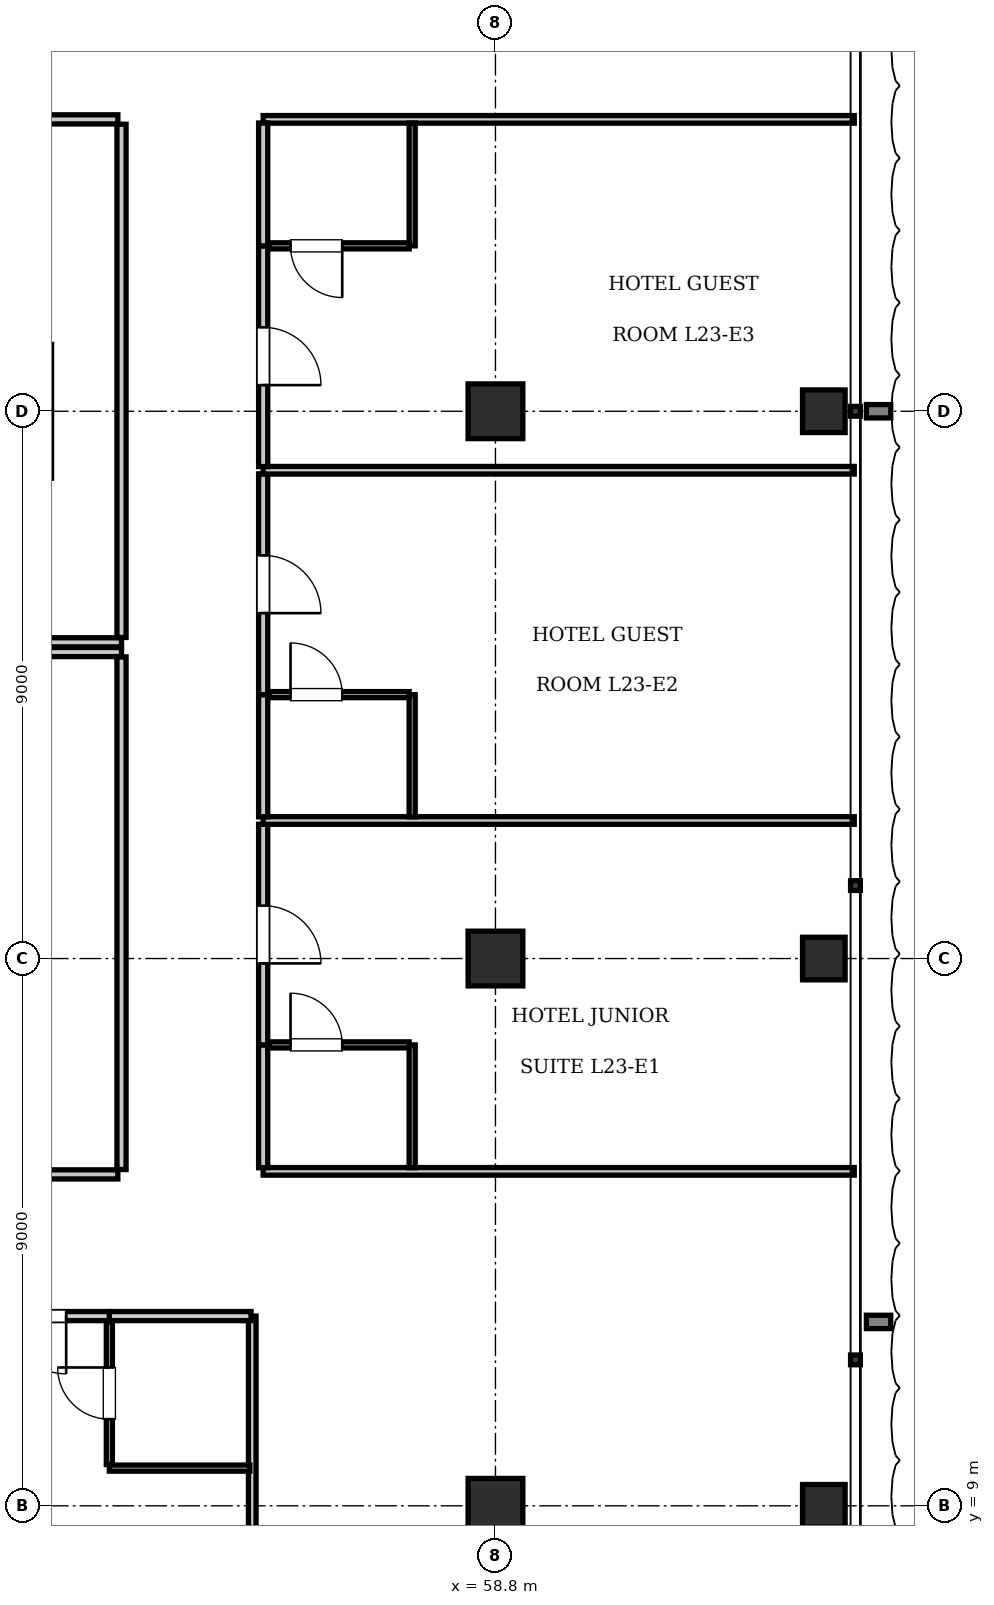
"""IFC4 building model, lengths in metres.
Left out: names, types, materials, properties, quantities, classifications, styles, units other than length and angle.
Written with IfcOpenShell. Run it as: python <this file> out.ifc"""

import sys

from ifc_helpers import new_model, si_unit, direction, frame, frame_2d, origin, origin_2d, place, context, subcontext, project, spatial, rectangle, i_section, extrude, element, fill, save


model = new_model("IFC4")
c1 = context("Model", 3, precision=1e-05, world=origin(), true_north=direction((0.0, 1.0)))
c2 = subcontext(c1, "Body", "Model", "MODEL_VIEW")
j1 = project(units=[si_unit("LENGTHUNIT", "METRE"), si_unit("PLANEANGLEUNIT", "RADIAN")], contexts=[c1])
p1 = place(None, origin())
s1 = spatial("IfcSite", under=j1, at=p1, CompositionType="ELEMENT")
p2 = place(p1, origin())
s2 = spatial("IfcBuilding", under=s1, at=p2, CompositionType="ELEMENT")
p3 = place(p2, frame((0.0, 0.0, 96.25)))
s3 = spatial("IfcBuildingStorey", under=s2, at=p3, CompositionType="ELEMENT", Elevation=96.25)
for number, where, z_axis, x_axis in (
    (1, (58.8, 9.0, 0.0), (0.0, 0.0, 1.0), (1.0, 0.0, 0.0)),
    (2, (58.8, 18.0, 0.0), (0.0, 0.0, 1.0), (1.0, 0.0, 0.0)),
    (3, (58.8, 27.0, 0.0), (0.0, 0.0, 1.0), (1.0, 0.0, 0.0)),
):
    element("IfcColumn", number, at=place(p3, frame(where, z_axis=z_axis, x_axis=x_axis)), inside=s3, PredefinedType="COLUMN", context=c2, shape_type="SweptSolid", body=[
        extrude(rectangle(XDim=0.9, YDim=0.9, at=origin_2d()), origin(), (0.0, 0.0, 1.0), 3.85),
    ])
for number, where, z_axis, x_axis in (
    (4, (64.2, 9.0, 0.0), (0.0, 0.0, 1.0), (1.0, 0.0, 0.0)),
    (5, (64.2, 18.0, 0.0), (0.0, 0.0, 1.0), (1.0, 0.0, 0.0)),
    (6, (64.2, 27.0, 0.0), (0.0, 0.0, 1.0), (1.0, 0.0, 0.0)),
):
    element("IfcColumn", number, at=place(p3, frame(where, z_axis=z_axis, x_axis=x_axis)), inside=s3, PredefinedType="COLUMN", context=c2, shape_type="SweptSolid", body=[
        extrude(i_section(OverallWidth=0.7, OverallDepth=0.7, WebThickness=0.028, FlangeThickness=0.044, at=origin_2d()), origin(), (0.0, 0.0, 1.0), 3.85),
    ])
p4 = place(p3, frame((22.95, 23.2, 0.0), z_axis=(0.0, 0.0, 1.0), x_axis=(1.0, 0.0, 0.0)))
e7 = element("IfcWall", 7, at=p4, inside=s3, PredefinedType="PARTITIONING", context=c2, shape_type="SweptSolid", body=[
    extrude(rectangle(XDim=29.7, YDim=0.15, at=frame_2d((14.85, 0.0))), origin(), (0.0, 0.0, 1.0), 3.61),
])
p5 = place(p3, frame((52.65, 23.28, 0.0), z_axis=(0.0, 0.0, 1.0), x_axis=(0.0, 1.0, 0.0)))
e8 = element("IfcWall", 8, at=p5, inside=s3, PredefinedType="PARTITIONING", context=c2, shape_type="SweptSolid", body=[
    extrude(rectangle(XDim=8.44, YDim=0.15, at=frame_2d((4.22, 0.0))), origin(), (0.0, 0.0, 1.0), 3.61),
])
p6 = place(p3, frame((42.582, 31.8, 0.0), z_axis=(0.0, 0.0, 1.0), x_axis=(1.0, 0.0, 0.0)))
e9 = element("IfcWall", 9, at=p6, inside=s3, PredefinedType="PARTITIONING", context=c2, shape_type="SweptSolid", body=[
    extrude(rectangle(XDim=10.008, YDim=0.15, at=frame_2d((5.004, 0.0))), origin(), (0.0, 0.0, 1.0), 3.61),
])
p7 = place(p6, frame((4.554, 0.0, 0.0)))
e10 = element("IfcOpeningElement", 10, at=p7, cuts=e9, PredefinedType="OPENING", context=c2, shape_type="SweptSolid", body=[
    extrude(rectangle(XDim=0.9, YDim=2.1, at=frame_2d((0.45, 1.05))), frame((0.0, 0.085, 0.0), z_axis=(0.0, -1.0, 0.0), x_axis=(1.0, 0.0, 0.0)), (0.0, 0.0, 1.0), 0.17),
])
p8 = place(p3, frame((22.95, 23.04, 0.0), z_axis=(0.0, 0.0, 1.0), x_axis=(1.0, 0.0, 0.0)))
e11 = element("IfcWall", 11, at=p8, inside=s3, PredefinedType="PARTITIONING", context=c2, shape_type="SweptSolid", body=[
    extrude(rectangle(XDim=29.7, YDim=0.15, at=frame_2d((14.85, 0.0))), origin(), (0.0, 0.0, 1.0), 3.61),
])
p9 = place(p3, frame((52.65, 14.53, 0.0), z_axis=(0.0, 0.0, 1.0), x_axis=(0.0, 1.0, 0.0)))
e12 = element("IfcWall", 12, at=p9, inside=s3, PredefinedType="PARTITIONING", context=c2, shape_type="SweptSolid", body=[
    extrude(rectangle(XDim=8.43, YDim=0.15, at=frame_2d((4.215, 0.0))), origin(), (0.0, 0.0, 1.0), 3.61),
])
p10 = place(p3, frame((33.969, 14.45, 0.0), z_axis=(0.0, 0.0, 1.0), x_axis=(1.0, 0.0, 0.0)))
e13 = element("IfcWall", 13, at=p10, inside=s3, PredefinedType="PARTITIONING", context=c2, shape_type="SweptSolid", body=[
    extrude(rectangle(XDim=18.621, YDim=0.15, at=frame_2d((9.311, 0.0))), origin(), (0.0, 0.0, 1.0), 3.61),
])
p11 = place(p10, frame((8.861, 0.0, 0.0)))
e14 = element("IfcOpeningElement", 14, at=p11, cuts=e13, PredefinedType="OPENING", context=c2, shape_type="SweptSolid", body=[
    extrude(rectangle(XDim=0.9, YDim=2.1, at=frame_2d((0.45, 1.05))), frame((0.0, 0.085, 0.0), z_axis=(0.0, -1.0, 0.0), x_axis=(1.0, 0.0, 0.0)), (0.0, 0.0, 1.0), 0.17),
])
p12 = place(p3, frame((54.8, 0.1, 0.0), z_axis=(0.0, 0.0, 1.0), x_axis=(0.0, 1.0, 0.0)))
e15 = element("IfcWall", 15, at=p12, inside=s3, PredefinedType="PARTITIONING", context=c2, shape_type="SweptSolid", body=[
    extrude(rectangle(XDim=12.02, YDim=0.125, at=frame_2d((6.01, 0.0))), origin(), (0.0, 0.0, 1.0), 3.61),
])
p13 = place(p3, frame((52.45, 12.12, 0.0), z_axis=(0.0, 0.0, 1.0), x_axis=(1.0, 0.0, 0.0)))
e16 = element("IfcWall", 16, at=p13, inside=s3, PredefinedType="PARTITIONING", context=c2, shape_type="SweptSolid", body=[
    extrude(rectangle(XDim=2.33, YDim=0.15, at=frame_2d((1.165, 0.0))), origin(), (0.0, 0.0, 1.0), 3.61),
])
p14 = place(p3, frame((52.45, 9.62, 0.0), z_axis=(0.0, 0.0, 1.0), x_axis=(1.0, 0.0, 0.0)))
e17 = element("IfcWall", 17, at=p14, inside=s3, PredefinedType="PARTITIONING", context=c2, shape_type="SweptSolid", body=[
    extrude(rectangle(XDim=2.31, YDim=0.1, at=frame_2d((1.155, 0.0))), origin(), (0.0, 0.0, 1.0), 3.61),
])
p15 = place(p3, frame((52.45, 9.68, 0.0), z_axis=(0.0, 0.0, 1.0), x_axis=(0.0, 1.0, 0.0)))
e18 = element("IfcWall", 18, at=p15, inside=s3, PredefinedType="PARTITIONING", context=c2, shape_type="SweptSolid", body=[
    extrude(rectangle(XDim=2.34, YDim=0.1, at=frame_2d((1.17, 0.0))), origin(), (0.0, 0.0, 1.0), 3.61),
])
p16 = place(p15, frame((0.745, 0.0, 0.0)))
e19 = element("IfcOpeningElement", 19, at=p16, cuts=e18, PredefinedType="OPENING", context=c2, shape_type="SweptSolid", body=[
    extrude(rectangle(XDim=0.85, YDim=2.1, at=frame_2d((0.425, 1.05))), frame((0.0, 0.06, 0.0), z_axis=(0.0, -1.0, 0.0), x_axis=(1.0, 0.0, 0.0)), (0.0, 0.0, 1.0), 0.12),
])
p17 = place(p3, frame((50.08, 12.12, 0.0), z_axis=(0.0, 0.0, 1.0), x_axis=(1.0, 0.0, 0.0)))
e20 = element("IfcWall", 20, at=p17, inside=s3, PredefinedType="PARTITIONING", context=c2, shape_type="SweptSolid", body=[
    extrude(rectangle(XDim=2.37, YDim=0.15, at=frame_2d((1.185, 0.0))), origin(), (0.0, 0.0, 1.0), 3.61),
])
p18 = place(p17, frame((0.71, 0.0, 0.0)))
e21 = element("IfcOpeningElement", 21, at=p18, cuts=e20, PredefinedType="OPENING", context=c2, shape_type="SweptSolid", body=[
    extrude(rectangle(XDim=0.95, YDim=2.15, at=frame_2d((0.475, 1.075))), frame((0.0, 0.085, 0.0), z_axis=(0.0, -1.0, 0.0), x_axis=(1.0, 0.0, 0.0)), (0.0, 0.0, 1.0), 0.17),
])
for number, where, z_axis, x_axis in (
    (22, (54.98, 14.5, 0.0), (0.0, 0.0, 1.0), (1.0, 0.0, 0.0)),
    (23, (54.98, 31.8, 0.0), (0.0, 0.0, 1.0), (1.0, 0.0, 0.0)),
):
    element("IfcWall", number, at=place(p3, frame(where, z_axis=z_axis, x_axis=x_axis)), inside=s3, PredefinedType="PARTITIONING", context=c2, shape_type="SweptSolid", body=[
        extrude(rectangle(XDim=9.72, YDim=0.125, at=frame_2d((4.86, 0.0))), origin(), (0.0, 0.0, 1.0), 3.61),
    ])
p19 = place(p3, frame((54.98, 14.56, 0.0), z_axis=(0.0, 0.0, 1.0), x_axis=(0.0, 1.0, 0.0)))
e24 = element("IfcWall", 24, at=p19, inside=s3, PredefinedType="PARTITIONING", context=c2, shape_type="SweptSolid", body=[
    extrude(rectangle(XDim=2.02, YDim=0.15, at=frame_2d((1.01, 0.0))), origin(), (0.0, 0.0, 1.0), 3.61),
])
p20 = place(p3, frame((54.98, 16.58, 0.0), z_axis=(0.0, 0.0, 1.0), x_axis=(0.0, 1.0, 0.0)))
e25 = element("IfcWall", 25, at=p20, inside=s3, PredefinedType="PARTITIONING", context=c2, shape_type="SweptSolid", body=[
    extrude(rectangle(XDim=3.63, YDim=0.15, at=frame_2d((1.815, 0.0))), origin(), (0.0, 0.0, 1.0), 3.61),
])
p21 = place(p20, frame((1.34, 0.0, 0.0)))
e26 = element("IfcOpeningElement", 26, at=p21, cuts=e25, PredefinedType="OPENING", context=c2, shape_type="SweptSolid", body=[
    extrude(rectangle(XDim=0.95, YDim=2.15, at=frame_2d((0.475, 1.075))), frame((0.0, 0.085, 0.0), z_axis=(0.0, -1.0, 0.0), x_axis=(1.0, 0.0, 0.0)), (0.0, 0.0, 1.0), 0.17),
])
p22 = place(p3, frame((57.43, 14.56, 0.0), z_axis=(0.0, 0.0, 1.0), x_axis=(0.0, 1.0, 0.0)))
e27 = element("IfcWall", 27, at=p22, inside=s3, PredefinedType="PARTITIONING", context=c2, shape_type="SweptSolid", body=[
    extrude(rectangle(XDim=2.02, YDim=0.1, at=frame_2d((1.01, 0.0))), origin(), (0.0, 0.0, 1.0), 3.61),
])
p23 = place(p3, frame((55.08, 16.58, 0.0), z_axis=(0.0, 0.0, 1.0), x_axis=(1.0, 0.0, 0.0)))
e28 = element("IfcWall", 28, at=p23, inside=s3, PredefinedType="PARTITIONING", context=c2, shape_type="SweptSolid", body=[
    extrude(rectangle(XDim=2.3, YDim=0.1, at=frame_2d((1.15, 0.0))), origin(), (0.0, 0.0, 1.0), 3.61),
])
p24 = place(p23, frame((0.35, 0.0, 0.0)))
e29 = element("IfcOpeningElement", 29, at=p24, cuts=e28, PredefinedType="OPENING", context=c2, shape_type="SweptSolid", body=[
    extrude(rectangle(XDim=0.85, YDim=2.1, at=frame_2d((0.425, 1.05))), frame((0.0, 0.06, 0.0), z_axis=(0.0, -1.0, 0.0), x_axis=(1.0, 0.0, 0.0)), (0.0, 0.0, 1.0), 0.12),
])
p25 = place(p3, frame((54.98, 20.27, 0.0), z_axis=(0.0, 0.0, 1.0), x_axis=(1.0, 0.0, 0.0)))
e30 = element("IfcWall", 30, at=p25, inside=s3, PredefinedType="PARTITIONING", context=c2, shape_type="SweptSolid", body=[
    extrude(rectangle(XDim=9.72, YDim=0.125, at=frame_2d((4.86, 0.0))), origin(), (0.0, 0.0, 1.0), 3.61),
])
p26 = place(p3, frame((54.98, 20.33, 0.0), z_axis=(0.0, 0.0, 1.0), x_axis=(0.0, 1.0, 0.0)))
e31 = element("IfcWall", 31, at=p26, inside=s3, PredefinedType="PARTITIONING", context=c2, shape_type="SweptSolid", body=[
    extrude(rectangle(XDim=2.01, YDim=0.15, at=frame_2d((1.005, 0.0))), origin(), (0.0, 0.0, 1.0), 3.61),
])
p27 = place(p3, frame((54.98, 22.34, 0.0), z_axis=(0.0, 0.0, 1.0), x_axis=(0.0, 1.0, 0.0)))
e32 = element("IfcWall", 32, at=p27, inside=s3, PredefinedType="PARTITIONING", context=c2, shape_type="SweptSolid", body=[
    extrude(rectangle(XDim=3.63, YDim=0.15, at=frame_2d((1.815, 0.0))), origin(), (0.0, 0.0, 1.0), 3.61),
])
p28 = place(p27, frame((1.34, 0.0, 0.0)))
e33 = element("IfcOpeningElement", 33, at=p28, cuts=e32, PredefinedType="OPENING", context=c2, shape_type="SweptSolid", body=[
    extrude(rectangle(XDim=0.95, YDim=2.15, at=frame_2d((0.475, 1.075))), frame((0.0, 0.085, 0.0), z_axis=(0.0, -1.0, 0.0), x_axis=(1.0, 0.0, 0.0)), (0.0, 0.0, 1.0), 0.17),
])
p29 = place(p3, frame((57.43, 20.33, 0.0), z_axis=(0.0, 0.0, 1.0), x_axis=(0.0, 1.0, 0.0)))
e34 = element("IfcWall", 34, at=p29, inside=s3, PredefinedType="PARTITIONING", context=c2, shape_type="SweptSolid", body=[
    extrude(rectangle(XDim=2.01, YDim=0.1, at=frame_2d((1.005, 0.0))), origin(), (0.0, 0.0, 1.0), 3.61),
])
p30 = place(p3, frame((55.08, 22.34, 0.0), z_axis=(0.0, 0.0, 1.0), x_axis=(1.0, 0.0, 0.0)))
e35 = element("IfcWall", 35, at=p30, inside=s3, PredefinedType="PARTITIONING", context=c2, shape_type="SweptSolid", body=[
    extrude(rectangle(XDim=2.3, YDim=0.1, at=frame_2d((1.15, 0.0))), origin(), (0.0, 0.0, 1.0), 3.61),
])
p31 = place(p30, frame((0.35, 0.0, 0.0)))
e36 = element("IfcOpeningElement", 36, at=p31, cuts=e35, PredefinedType="OPENING", context=c2, shape_type="SweptSolid", body=[
    extrude(rectangle(XDim=0.85, YDim=2.1, at=frame_2d((0.425, 1.05))), frame((0.0, 0.06, 0.0), z_axis=(0.0, -1.0, 0.0), x_axis=(1.0, 0.0, 0.0)), (0.0, 0.0, 1.0), 0.12),
])
p32 = place(p3, frame((54.98, 26.03, 0.0), z_axis=(0.0, 0.0, 1.0), x_axis=(1.0, 0.0, 0.0)))
e37 = element("IfcWall", 37, at=p32, inside=s3, PredefinedType="PARTITIONING", context=c2, shape_type="SweptSolid", body=[
    extrude(rectangle(XDim=9.72, YDim=0.125, at=frame_2d((4.86, 0.0))), origin(), (0.0, 0.0, 1.0), 3.61),
])
p33 = place(p3, frame((54.98, 26.09, 0.0), z_axis=(0.0, 0.0, 1.0), x_axis=(0.0, 1.0, 0.0)))
e38 = element("IfcWall", 38, at=p33, inside=s3, PredefinedType="PARTITIONING", context=c2, shape_type="SweptSolid", body=[
    extrude(rectangle(XDim=3.63, YDim=0.15, at=frame_2d((1.815, 0.0))), origin(), (0.0, 0.0, 1.0), 3.61),
])
p34 = place(p33, frame((1.34, 0.0, 0.0)))
e39 = element("IfcOpeningElement", 39, at=p34, cuts=e38, PredefinedType="OPENING", context=c2, shape_type="SweptSolid", body=[
    extrude(rectangle(XDim=0.95, YDim=2.15, at=frame_2d((0.475, 1.075))), frame((0.0, 0.085, 0.0), z_axis=(0.0, -1.0, 0.0), x_axis=(1.0, 0.0, 0.0)), (0.0, 0.0, 1.0), 0.17),
])
p35 = place(p3, frame((54.98, 29.72, 0.0), z_axis=(0.0, 0.0, 1.0), x_axis=(0.0, 1.0, 0.0)))
e40 = element("IfcWall", 40, at=p35, inside=s3, PredefinedType="PARTITIONING", context=c2, shape_type="SweptSolid", body=[
    extrude(rectangle(XDim=2.02, YDim=0.15, at=frame_2d((1.01, 0.0))), origin(), (0.0, 0.0, 1.0), 3.61),
])
p36 = place(p3, frame((57.43, 29.72, 0.0), z_axis=(0.0, 0.0, 1.0), x_axis=(0.0, 1.0, 0.0)))
e41 = element("IfcWall", 41, at=p36, inside=s3, PredefinedType="PARTITIONING", context=c2, shape_type="SweptSolid", body=[
    extrude(rectangle(XDim=2.02, YDim=0.1, at=frame_2d((1.01, 0.0))), origin(), (0.0, 0.0, 1.0), 3.61),
])
p37 = place(p3, frame((55.08, 29.72, 0.0), z_axis=(0.0, 0.0, 1.0), x_axis=(1.0, 0.0, 0.0)))
e42 = element("IfcWall", 42, at=p37, inside=s3, PredefinedType="PARTITIONING", context=c2, shape_type="SweptSolid", body=[
    extrude(rectangle(XDim=2.3, YDim=0.1, at=frame_2d((1.15, 0.0))), origin(), (0.0, 0.0, 1.0), 3.61),
])
p38 = place(p37, frame((0.35, 0.0, 0.0)))
e43 = element("IfcOpeningElement", 43, at=p38, cuts=e42, PredefinedType="OPENING", context=c2, shape_type="SweptSolid", body=[
    extrude(rectangle(XDim=0.85, YDim=2.1, at=frame_2d((0.425, 1.05))), frame((0.0, 0.06, 0.0), z_axis=(0.0, -1.0, 0.0), x_axis=(1.0, 0.0, 0.0)), (0.0, 0.0, 1.0), 0.12),
])
p39 = place(p16, origin())
e44 = element("IfcDoor", 44, at=p39, inside=s3, OperationType="SINGLE_SWING_RIGHT", PredefinedType="DOOR", context=c2, shape_type="SweptSolid", body=[
    extrude(rectangle(XDim=0.85, YDim=2.1, at=frame_2d((0.425, 1.05))), frame((0.0, 0.025, 0.0), z_axis=(0.0, -1.0, 0.0), x_axis=(1.0, 0.0, 0.0)), (0.0, 0.0, 1.0), 0.05),
])
fill(e19, e44)
p40 = place(p18, frame((0.95, 0.0, 0.0), z_axis=(0.0, 0.0, 1.0), x_axis=(-1.0, 0.0, 0.0)))
e45 = element("IfcDoor", 45, at=p40, inside=s3, OperationType="SINGLE_SWING_LEFT", PredefinedType="DOOR", context=c2, shape_type="SweptSolid", body=[
    extrude(rectangle(XDim=0.95, YDim=2.15, at=frame_2d((0.475, 1.075))), frame((0.0, 0.025, 0.0), z_axis=(0.0, -1.0, 0.0), x_axis=(1.0, 0.0, 0.0)), (0.0, 0.0, 1.0), 0.05),
])
fill(e21, e45)
p41 = place(p24, origin())
e46 = element("IfcDoor", 46, at=p41, inside=s3, OperationType="SINGLE_SWING_LEFT", PredefinedType="DOOR", context=c2, shape_type="SweptSolid", body=[
    extrude(rectangle(XDim=0.85, YDim=2.1, at=frame_2d((0.425, 1.05))), frame((0.0, 0.025, 0.0), z_axis=(0.0, -1.0, 0.0), x_axis=(1.0, 0.0, 0.0)), (0.0, 0.0, 1.0), 0.05),
])
fill(e29, e46)
p42 = place(p21, frame((0.95, 0.0, 0.0), z_axis=(0.0, 0.0, 1.0), x_axis=(-1.0, 0.0, 0.0)))
e47 = element("IfcDoor", 47, at=p42, inside=s3, OperationType="SINGLE_SWING_RIGHT", PredefinedType="DOOR", context=c2, shape_type="SweptSolid", body=[
    extrude(rectangle(XDim=0.95, YDim=2.15, at=frame_2d((0.475, 1.075))), frame((0.0, 0.025, 0.0), z_axis=(0.0, -1.0, 0.0), x_axis=(1.0, 0.0, 0.0)), (0.0, 0.0, 1.0), 0.05),
])
fill(e26, e47)
p43 = place(p31, origin())
e48 = element("IfcDoor", 48, at=p43, inside=s3, OperationType="SINGLE_SWING_LEFT", PredefinedType="DOOR", context=c2, shape_type="SweptSolid", body=[
    extrude(rectangle(XDim=0.85, YDim=2.1, at=frame_2d((0.425, 1.05))), frame((0.0, 0.025, 0.0), z_axis=(0.0, -1.0, 0.0), x_axis=(1.0, 0.0, 0.0)), (0.0, 0.0, 1.0), 0.05),
])
fill(e36, e48)
p44 = place(p28, frame((0.95, 0.0, 0.0), z_axis=(0.0, 0.0, 1.0), x_axis=(-1.0, 0.0, 0.0)))
e49 = element("IfcDoor", 49, at=p44, inside=s3, OperationType="SINGLE_SWING_RIGHT", PredefinedType="DOOR", context=c2, shape_type="SweptSolid", body=[
    extrude(rectangle(XDim=0.95, YDim=2.15, at=frame_2d((0.475, 1.075))), frame((0.0, 0.025, 0.0), z_axis=(0.0, -1.0, 0.0), x_axis=(1.0, 0.0, 0.0)), (0.0, 0.0, 1.0), 0.05),
])
fill(e33, e49)
p45 = place(p38, frame((0.85, 0.0, 0.0), z_axis=(0.0, 0.0, 1.0), x_axis=(-1.0, 0.0, 0.0)))
e50 = element("IfcDoor", 50, at=p45, inside=s3, OperationType="SINGLE_SWING_LEFT", PredefinedType="DOOR", context=c2, shape_type="SweptSolid", body=[
    extrude(rectangle(XDim=0.85, YDim=2.1, at=frame_2d((0.425, 1.05))), frame((0.0, 0.025, 0.0), z_axis=(0.0, -1.0, 0.0), x_axis=(1.0, 0.0, 0.0)), (0.0, 0.0, 1.0), 0.05),
])
fill(e43, e50)
p46 = place(p34, frame((0.95, 0.0, 0.0), z_axis=(0.0, 0.0, 1.0), x_axis=(-1.0, 0.0, 0.0)))
e51 = element("IfcDoor", 51, at=p46, inside=s3, OperationType="SINGLE_SWING_RIGHT", PredefinedType="DOOR", context=c2, shape_type="SweptSolid", body=[
    extrude(rectangle(XDim=0.95, YDim=2.15, at=frame_2d((0.475, 1.075))), frame((0.0, 0.025, 0.0), z_axis=(0.0, -1.0, 0.0), x_axis=(1.0, 0.0, 0.0)), (0.0, 0.0, 1.0), 0.05),
])
fill(e39, e51)
save(model, sys.argv[1])
